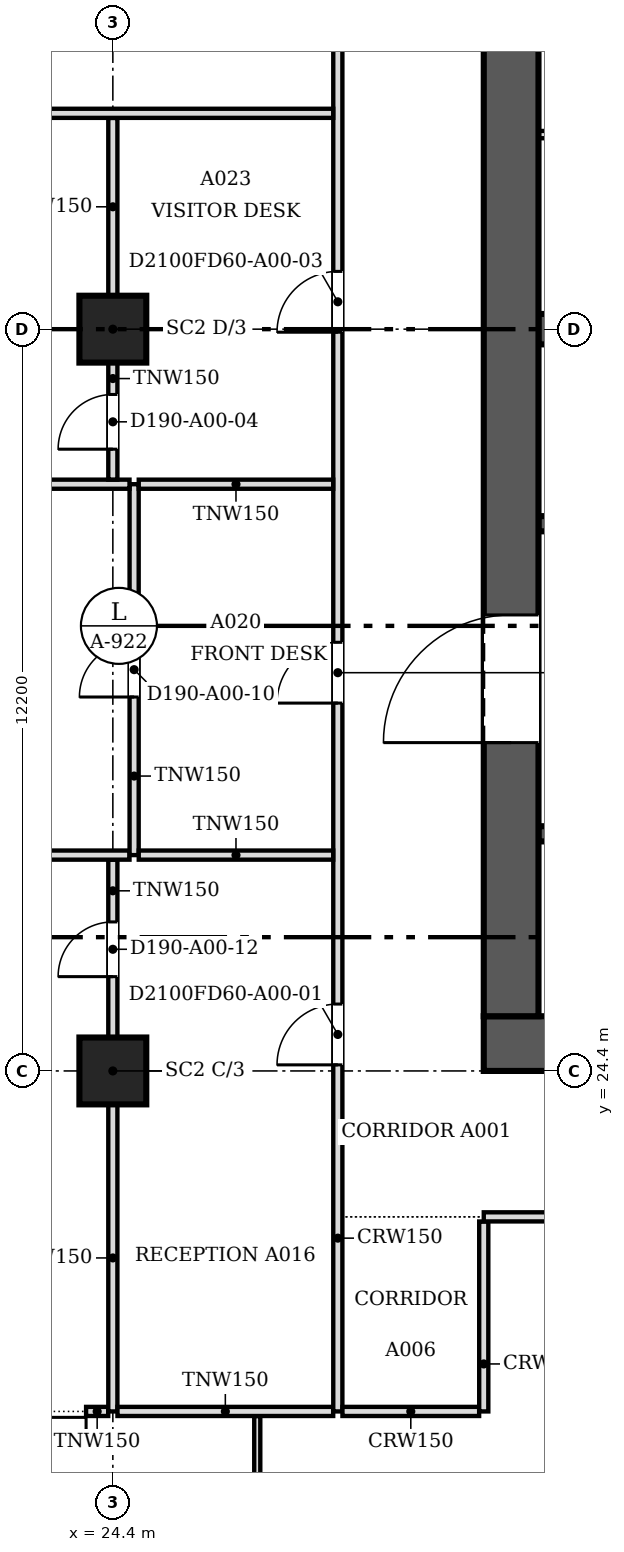
"""IFC4 building model, lengths in metres.
Left out: names, types, materials, properties, quantities, classifications, styles, units other than length and angle.
Written with IfcOpenShell. Run it as: python <this file> out.ifc"""

import sys

from ifc_helpers import new_model, si_unit, direction, frame, frame_2d, origin, origin_2d, place, context, subcontext, project, spatial, rectangle, extrude, source, transform, mapped, element, fill, save


model = new_model("IFC4")
c1 = context("Model", 3, precision=1e-05, world=origin(), true_north=direction((0.0, 1.0)))
c2 = subcontext(c1, "Body", "Model", "MODEL_VIEW")
j1 = project(units=[si_unit("LENGTHUNIT", "METRE"), si_unit("PLANEANGLEUNIT", "RADIAN")], contexts=[c1])
p1 = place(None, origin())
s1 = spatial("IfcSite", under=j1, at=p1, CompositionType="ELEMENT")
p2 = place(p1, origin())
s2 = spatial("IfcBuilding", under=s1, at=p2, CompositionType="ELEMENT")
p3 = place(p2, frame((0.0, 0.0, 16.8)))
s3 = spatial("IfcBuildingStorey", under=s2, at=p3, CompositionType="ELEMENT", Elevation=16.8)
for number, where, z_axis, x_axis in (
    (1, (24.4, 24.4, 0.0), (0.0, 0.0, 1.0), (1.0, 0.0, 0.0)),
    (2, (24.4, 36.6, 0.0), (0.0, 0.0, 1.0), (1.0, 0.0, 0.0)),
):
    element("IfcColumn", number, at=place(p3, frame(where, z_axis=z_axis, x_axis=x_axis)), inside=s3, PredefinedType="COLUMN", context=c2, shape_type="SweptSolid", body=[
        extrude(rectangle(XDim=1.1, YDim=1.1, at=origin_2d()), origin(), (0.0, 0.0, 1.0), 4.3),
    ])
p4 = place(p3, frame((54.9, 24.85, 0.0), z_axis=(0.0, 0.0, 1.0), x_axis=(-1.0, 0.0, 0.0)))
e3 = element("IfcWall", 3, at=p4, inside=s3, PredefinedType="SHEAR", context=c2, shape_type="SweptSolid", body=[
    extrude(rectangle(XDim=24.4, YDim=0.9, at=frame_2d((12.2, 0.0))), origin(), (0.0, 0.0, 1.0), 4.5),
])
m1 = source(origin(), c2, "Body", "SweptSolid", [
    extrude(rectangle(XDim=1.2, YDim=2.1, at=frame_2d((0.6, 1.05))), frame((0.0, 0.46, 0.0), z_axis=(0.0, -1.0, 0.0), x_axis=(1.0, 0.0, 0.0)), (0.0, 0.0, 1.0), 0.92),
])
p5 = place(p4, frame((1.5, 0.0, 0.0)))
e4 = element("IfcOpeningElement", 4, at=p5, cuts=e3, PredefinedType="OPENING", context=c2, shape_type="MappedRepresentation", body=[
    mapped(m1, transform((0.0, 0.0, 0.0), scale=1.0)),
])
p6 = place(p3, frame((30.95, 25.3, 0.0), z_axis=(0.0, 0.0, 1.0), x_axis=(0.0, 1.0, 0.0)))
e5 = element("IfcWall", 5, at=p6, inside=s3, PredefinedType="SHEAR", context=c2, shape_type="SweptSolid", body=[
    extrude(rectangle(XDim=22.6, YDim=0.9, at=frame_2d((11.3, 0.0))), origin(), (0.0, 0.0, 1.0), 4.5),
])
m2 = source(origin(), c2, "Body", "SweptSolid", [
    extrude(rectangle(XDim=2.1, YDim=2.4, at=frame_2d((1.05, 1.2))), frame((0.0, 0.46, 0.0), z_axis=(0.0, -1.0, 0.0), x_axis=(1.0, 0.0, 0.0)), (0.0, 0.0, 1.0), 0.92),
])
p7 = place(p6, frame((4.5, 0.0, 0.0)))
e6 = element("IfcOpeningElement", 6, at=p7, cuts=e5, PredefinedType="OPENING", context=c2, shape_type="MappedRepresentation", body=[
    mapped(m2, transform((0.0, 0.0, 0.0), scale=1.0)),
])
p8 = place(p6, frame((16.0, 0.0, 0.0)))
e7 = element("IfcOpeningElement", 7, at=p8, cuts=e5, PredefinedType="OPENING", context=c2, shape_type="MappedRepresentation", body=[
    mapped(m2, transform((0.0, 0.0, 0.0), scale=1.0)),
])
p9 = place(p3, frame((31.4, 36.6, 0.0), z_axis=(0.0, 0.0, 1.0), x_axis=(1.0, 0.0, 0.0)))
e8 = element("IfcWall", 8, at=p9, inside=s3, PredefinedType="SHEAR", context=c2, shape_type="SweptSolid", body=[
    extrude(rectangle(XDim=16.95, YDim=0.5, at=frame_2d((8.475, 0.0))), origin(), (0.0, 0.0, 1.0), 4.5),
])
p10 = place(p3, frame((42.45, 33.4, 0.0), z_axis=(0.0, 0.0, 1.0), x_axis=(-1.0, 0.0, 0.0)))
e9 = element("IfcWall", 9, at=p10, inside=s3, PredefinedType="SOLIDWALL", context=c2, shape_type="SweptSolid", body=[
    extrude(rectangle(XDim=11.05, YDim=0.25, at=frame_2d((5.525, 0.0))), origin(), (0.0, 0.0, 1.0), 4.5),
])
m3 = source(origin(), c2, "Body", "SweptSolid", [
    extrude(rectangle(XDim=1.1, YDim=2.1, at=frame_2d((0.55, 1.05))), frame((0.0, 0.135, 0.0), z_axis=(0.0, -1.0, 0.0), x_axis=(1.0, 0.0, 0.0)), (0.0, 0.0, 1.0), 0.27),
])
p11 = place(p10, frame((9.087, 0.0, 0.0)))
e10 = element("IfcOpeningElement", 10, at=p11, cuts=e9, PredefinedType="OPENING", context=c2, shape_type="MappedRepresentation", body=[
    mapped(m3, transform((0.0, 0.0, 0.0), scale=1.0)),
])
p12 = place(p10, frame((6.262, 0.0, 0.0)))
e11 = element("IfcOpeningElement", 11, at=p12, cuts=e9, PredefinedType="OPENING", context=c2, shape_type="MappedRepresentation", body=[
    mapped(m3, transform((0.0, 0.0, 0.0), scale=1.0)),
])
p13 = place(p10, frame((3.438, 0.0, 0.0)))
e12 = element("IfcOpeningElement", 12, at=p13, cuts=e9, PredefinedType="OPENING", context=c2, shape_type="MappedRepresentation", body=[
    mapped(m3, transform((0.0, 0.0, 0.0), scale=1.0)),
])
p14 = place(p10, frame((0.613, 0.0, 0.0)))
e13 = element("IfcOpeningElement", 13, at=p14, cuts=e9, PredefinedType="OPENING", context=c2, shape_type="MappedRepresentation", body=[
    mapped(m3, transform((0.0, 0.0, 0.0), scale=1.0)),
])
p15 = place(p3, frame((31.4, 28.3, 0.0), z_axis=(0.0, 0.0, 1.0), x_axis=(1.0, 0.0, 0.0)))
e14 = element("IfcWall", 14, at=p15, inside=s3, PredefinedType="SOLIDWALL", context=c2, shape_type="SweptSolid", body=[
    extrude(rectangle(XDim=11.05, YDim=0.25, at=frame_2d((5.525, 0.0))), origin(), (0.0, 0.0, 1.0), 4.5),
])
p16 = place(p15, frame((0.863, 0.0, 0.0)))
e15 = element("IfcOpeningElement", 15, at=p16, cuts=e14, PredefinedType="OPENING", context=c2, shape_type="MappedRepresentation", body=[
    mapped(m3, transform((0.0, 0.0, 0.0), scale=1.0)),
])
p17 = place(p15, frame((3.688, 0.0, 0.0)))
e16 = element("IfcOpeningElement", 16, at=p17, cuts=e14, PredefinedType="OPENING", context=c2, shape_type="MappedRepresentation", body=[
    mapped(m3, transform((0.0, 0.0, 0.0), scale=1.0)),
])
p18 = place(p15, frame((6.512, 0.0, 0.0)))
e17 = element("IfcOpeningElement", 17, at=p18, cuts=e14, PredefinedType="OPENING", context=c2, shape_type="MappedRepresentation", body=[
    mapped(m3, transform((0.0, 0.0, 0.0), scale=1.0)),
])
p19 = place(p15, frame((9.337, 0.0, 0.0)))
e18 = element("IfcOpeningElement", 18, at=p19, cuts=e14, PredefinedType="OPENING", context=c2, shape_type="MappedRepresentation", body=[
    mapped(m3, transform((0.0, 0.0, 0.0), scale=1.0)),
])
p20 = place(p3, frame((42.45, 39.8, 0.0), z_axis=(0.0, 0.0, 1.0), x_axis=(-1.0, 0.0, 0.0)))
e19 = element("IfcWall", 19, at=p20, inside=s3, PredefinedType="PARTITIONING", context=c2, shape_type="SweptSolid", body=[
    extrude(rectangle(XDim=11.05, YDim=0.12, at=frame_2d((5.525, 0.0))), origin(), (0.0, 0.0, 1.0), 4.3),
])
m4 = source(origin(), c2, "Body", "SweptSolid", [
    extrude(rectangle(XDim=0.9, YDim=2.1, at=frame_2d((0.45, 1.05))), frame((0.0, 0.07, 0.0), z_axis=(0.0, -1.0, 0.0), x_axis=(1.0, 0.0, 0.0)), (0.0, 0.0, 1.0), 0.14),
])
p21 = place(p20, frame((4.95, 0.0, 0.0)))
e20 = element("IfcOpeningElement", 20, at=p21, cuts=e19, PredefinedType="OPENING", context=c2, shape_type="MappedRepresentation", body=[
    mapped(m4, transform((0.0, 0.0, 0.0), scale=1.0)),
])
p22 = place(p3, frame((26.775, 13.276, 0.0), z_axis=(0.0, 0.0, 1.0), x_axis=(0.0, 1.0, 0.0)))
e21 = element("IfcWall", 21, at=p22, inside=s3, PredefinedType="PARTITIONING", context=c2, shape_type="SweptSolid", body=[
    extrude(rectangle(XDim=5.448, YDim=0.1, at=frame_2d((2.724, 0.0))), origin(), (0.0, 0.0, 1.0), 3.415),
])
m5 = source(origin(), c2, "Body", "SweptSolid", [
    extrude(rectangle(XDim=0.9, YDim=2.1, at=frame_2d((0.45, 1.05))), frame((0.0, 0.06, 0.0), z_axis=(0.0, -1.0, 0.0), x_axis=(1.0, 0.0, 0.0)), (0.0, 0.0, 1.0), 0.12),
])
p23 = place(p22, frame((2.3, 0.0, 0.0)))
e22 = element("IfcOpeningElement", 22, at=p23, cuts=e21, PredefinedType="OPENING", context=c2, shape_type="MappedRepresentation", body=[
    mapped(m5, transform((0.0, 0.0, 0.0), scale=1.0)),
])
p24 = place(p3, frame((23.96, 18.8, 0.0), z_axis=(0.0, 0.0, 1.0), x_axis=(1.0, 0.0, 0.0)))
e23 = element("IfcWall", 23, at=p24, inside=s3, PredefinedType="PARTITIONING", context=c2, shape_type="SweptSolid", body=[
    extrude(rectangle(XDim=0.364, YDim=0.15, at=frame_2d((0.182, 0.0))), origin(), (0.0, 0.0, 1.0), 3.415),
])
p25 = place(p3, frame((24.4, 18.8, 0.0), z_axis=(0.0, 0.0, 1.0), x_axis=(0.0, 1.0, 0.0)))
e24 = element("IfcWall", 24, at=p25, inside=s3, PredefinedType="PARTITIONING", context=c2, shape_type="SweptSolid", body=[
    extrude(rectangle(XDim=5.049, YDim=0.15, at=frame_2d((2.524, 0.0))), origin(), (0.0, 0.0, 1.0), 3.415),
])
p26 = place(p3, frame((24.476, 18.8, 0.0), z_axis=(0.0, 0.0, 1.0), x_axis=(1.0, 0.0, 0.0)))
e25 = element("IfcWall", 25, at=p26, inside=s3, PredefinedType="PARTITIONING", context=c2, shape_type="SweptSolid", body=[
    extrude(rectangle(XDim=3.548, YDim=0.15, at=frame_2d((1.774, 0.0))), origin(), (0.0, 0.0, 1.0), 3.415),
])
p27 = place(p3, frame((28.1, 18.8, 0.0), z_axis=(0.0, 0.0, 1.0), x_axis=(0.0, 1.0, 0.0)))
e26 = element("IfcWall", 26, at=p27, inside=s3, PredefinedType="PARTITIONING", context=c2, shape_type="SweptSolid", body=[
    extrude(rectangle(XDim=26.424, YDim=0.15, at=frame_2d((13.212, 0.0))), origin(), (0.0, 0.0, 1.0), 3.415),
])
m6 = source(origin(), c2, "Body", "SweptSolid", [
    extrude(rectangle(XDim=0.9, YDim=2.1, at=frame_2d((0.45, 1.05))), frame((0.0, 0.085, 0.0), z_axis=(0.0, -1.0, 0.0), x_axis=(1.0, 0.0, 0.0)), (0.0, 0.0, 1.0), 0.17),
])
p28 = place(p27, frame((23.451, 0.0, 0.0)))
e27 = element("IfcOpeningElement", 27, at=p28, cuts=e26, PredefinedType="OPENING", context=c2, shape_type="MappedRepresentation", body=[
    mapped(m6, transform((0.0, 0.0, 0.0), scale=1.0)),
])
m7 = source(origin(), c2, "Body", "SweptSolid", [
    extrude(rectangle(XDim=1.0, YDim=2.1, at=frame_2d((0.5, 1.05))), frame((0.0, 0.085, 0.0), z_axis=(0.0, -1.0, 0.0), x_axis=(1.0, 0.0, 0.0)), (0.0, 0.0, 1.0), 0.17),
])
p29 = place(p27, frame((5.7, 0.0, 0.0)))
e28 = element("IfcOpeningElement", 28, at=p29, cuts=e26, PredefinedType="OPENING", context=c2, shape_type="MappedRepresentation", body=[
    mapped(m7, transform((0.0, 0.0, 0.0), scale=1.0)),
])
p30 = place(p27, frame((11.65, 0.0, 0.0)))
e29 = element("IfcOpeningElement", 29, at=p30, cuts=e26, PredefinedType="OPENING", context=c2, shape_type="MappedRepresentation", body=[
    mapped(m7, transform((0.0, 0.0, 0.0), scale=1.0)),
])
p31 = place(p27, frame((17.75, 0.0, 0.0)))
e30 = element("IfcOpeningElement", 30, at=p31, cuts=e26, PredefinedType="OPENING", context=c2, shape_type="MappedRepresentation", body=[
    mapped(m7, transform((0.0, 0.0, 0.0), scale=1.0)),
])
p32 = place(p3, frame((28.176, 18.8, 0.0), z_axis=(0.0, 0.0, 1.0), x_axis=(1.0, 0.0, 0.0)))
e31 = element("IfcWall", 31, at=p32, inside=s3, PredefinedType="PARTITIONING", context=c2, shape_type="SweptSolid", body=[
    extrude(rectangle(XDim=2.248, YDim=0.15, at=frame_2d((1.124, 0.0))), origin(), (0.0, 0.0, 1.0), 3.415),
])
p33 = place(p3, frame((30.5, 18.8, 0.0), z_axis=(0.0, 0.0, 1.0), x_axis=(0.0, 1.0, 0.0)))
e32 = element("IfcWall", 32, at=p33, inside=s3, PredefinedType="PARTITIONING", context=c2, shape_type="SweptSolid", body=[
    extrude(rectangle(XDim=3.124, YDim=0.15, at=frame_2d((1.562, 0.0))), origin(), (0.0, 0.0, 1.0), 3.415),
])
p34 = place(p3, frame((30.5, 22.0, 0.0), z_axis=(0.0, 0.0, 1.0), x_axis=(1.0, 0.0, 0.0)))
e33 = element("IfcWall", 33, at=p34, inside=s3, PredefinedType="PARTITIONING", context=c2, shape_type="SweptSolid", body=[
    extrude(rectangle(XDim=13.5, YDim=0.15, at=frame_2d((6.75, 0.0))), origin(), (0.0, 0.0, 1.0), 3.415),
])
p35 = place(p3, frame((24.4, 24.951, 0.0), z_axis=(0.0, 0.0, 1.0), x_axis=(0.0, 1.0, 0.0)))
e34 = element("IfcWall", 34, at=p35, inside=s3, PredefinedType="PARTITIONING", context=c2, shape_type="SweptSolid", body=[
    extrude(rectangle(XDim=2.923, YDim=0.15, at=frame_2d((1.461, 0.0))), origin(), (0.0, 0.0, 1.0), 3.415),
])
p36 = place(p35, frame((1.0, 0.0, 0.0)))
e35 = element("IfcOpeningElement", 35, at=p36, cuts=e34, PredefinedType="OPENING", context=c2, shape_type="MappedRepresentation", body=[
    mapped(m6, transform((0.0, 0.0, 0.0), scale=1.0)),
])
p37 = place(p3, frame((0.5, 27.95, 0.0), z_axis=(0.0, 0.0, 1.0), x_axis=(1.0, 0.0, 0.0)))
e36 = element("IfcWall", 36, at=p37, inside=s3, PredefinedType="PARTITIONING", context=c2, shape_type="SweptSolid", body=[
    extrude(rectangle(XDim=24.174, YDim=0.15, at=frame_2d((12.087, 0.0))), origin(), (0.0, 0.0, 1.0), 3.415),
])
p38 = place(p3, frame((24.75, 27.95, 0.0), z_axis=(0.0, 0.0, 1.0), x_axis=(0.0, 1.0, 0.0)))
e37 = element("IfcWall", 37, at=p38, inside=s3, PredefinedType="PARTITIONING", context=c2, shape_type="SweptSolid", body=[
    extrude(rectangle(XDim=6.1, YDim=0.15, at=frame_2d((3.05, 0.0))), origin(), (0.0, 0.0, 1.0), 3.415),
])
p39 = place(p38, frame((2.6, 0.0, 0.0)))
e38 = element("IfcOpeningElement", 38, at=p39, cuts=e37, PredefinedType="OPENING", context=c2, shape_type="MappedRepresentation", body=[
    mapped(m6, transform((0.0, 0.0, 0.0), scale=1.0)),
])
p40 = place(p3, frame((24.826, 27.95, 0.0), z_axis=(0.0, 0.0, 1.0), x_axis=(1.0, 0.0, 0.0)))
e39 = element("IfcWall", 39, at=p40, inside=s3, PredefinedType="PARTITIONING", context=c2, shape_type="SweptSolid", body=[
    extrude(rectangle(XDim=3.198, YDim=0.15, at=frame_2d((1.599, 0.0))), origin(), (0.0, 0.0, 1.0), 3.415),
])
p41 = place(p3, frame((0.5, 34.05, 0.0), z_axis=(0.0, 0.0, 1.0), x_axis=(1.0, 0.0, 0.0)))
e40 = element("IfcWall", 40, at=p41, inside=s3, PredefinedType="PARTITIONING", context=c2, shape_type="SweptSolid", body=[
    extrude(rectangle(XDim=24.174, YDim=0.15, at=frame_2d((12.087, 0.0))), origin(), (0.0, 0.0, 1.0), 3.415),
])
p42 = place(p3, frame((24.826, 34.05, 0.0), z_axis=(0.0, 0.0, 1.0), x_axis=(1.0, 0.0, 0.0)))
e41 = element("IfcWall", 41, at=p42, inside=s3, PredefinedType="PARTITIONING", context=c2, shape_type="SweptSolid", body=[
    extrude(rectangle(XDim=3.198, YDim=0.15, at=frame_2d((1.599, 0.0))), origin(), (0.0, 0.0, 1.0), 3.415),
])
p43 = place(p3, frame((24.4, 34.126, 0.0), z_axis=(0.0, 0.0, 1.0), x_axis=(0.0, 1.0, 0.0)))
e42 = element("IfcWall", 42, at=p43, inside=s3, PredefinedType="PARTITIONING", context=c2, shape_type="SweptSolid", body=[
    extrude(rectangle(XDim=1.923, YDim=0.15, at=frame_2d((0.961, 0.0))), origin(), (0.0, 0.0, 1.0), 3.415),
])
p44 = place(p43, frame((0.5, 0.0, 0.0)))
e43 = element("IfcOpeningElement", 43, at=p44, cuts=e42, PredefinedType="OPENING", context=c2, shape_type="MappedRepresentation", body=[
    mapped(m6, transform((0.0, 0.0, 0.0), scale=1.0)),
])
p45 = place(p3, frame((24.4, 37.151, 0.0), z_axis=(0.0, 0.0, 1.0), x_axis=(0.0, 1.0, 0.0)))
e44 = element("IfcWall", 44, at=p45, inside=s3, PredefinedType="PARTITIONING", context=c2, shape_type="SweptSolid", body=[
    extrude(rectangle(XDim=2.923, YDim=0.15, at=frame_2d((1.461, 0.0))), origin(), (0.0, 0.0, 1.0), 3.415),
])
p46 = place(p3, frame((7.5, 40.15, 0.0), z_axis=(0.0, 0.0, 1.0), x_axis=(1.0, 0.0, 0.0)))
e45 = element("IfcWall", 45, at=p46, inside=s3, PredefinedType="PARTITIONING", context=c2, shape_type="SweptSolid", body=[
    extrude(rectangle(XDim=20.524, YDim=0.15, at=frame_2d((10.262, 0.0))), origin(), (0.0, 0.0, 1.0), 3.415),
])
m8 = source(origin(), c2, "Body", "SweptSolid", [
    extrude(rectangle(XDim=2.1, YDim=2.4, at=frame_2d((1.05, 1.2))), frame((0.0, 0.025, 0.0), z_axis=(0.0, -1.0, 0.0), x_axis=(1.0, 0.0, 0.0)), (0.0, 0.0, 1.0), 0.05),
])
p47 = place(p7, origin())
e46 = element("IfcDoor", 46, at=p47, inside=s3, OperationType="DOUBLE_DOOR_SINGLE_SWING", PredefinedType="DOOR", context=c2, shape_type="MappedRepresentation", body=[
    mapped(m8, transform((0.0, 0.0, 0.0), scale=1.0)),
])
fill(e6, e46)
m9 = source(origin(), c2, "Body", "SweptSolid", [
    extrude(rectangle(XDim=0.9, YDim=2.1, at=frame_2d((0.45, 1.05))), frame((0.0, 0.025, 0.0), z_axis=(0.0, -1.0, 0.0), x_axis=(1.0, 0.0, 0.0)), (0.0, 0.0, 1.0), 0.05),
])
p48 = place(p44, origin())
e47 = element("IfcDoor", 47, at=p48, inside=s3, OperationType="SINGLE_SWING_LEFT", PredefinedType="DOOR", context=c2, shape_type="MappedRepresentation", body=[
    mapped(m9, transform((0.0, 0.0, 0.0), scale=1.0)),
])
fill(e43, e47)
m10 = source(origin(), c2, "Body", "SweptSolid", [
    extrude(rectangle(XDim=1.0, YDim=2.1, at=frame_2d((0.5, 1.05))), frame((0.0, 0.025, 0.0), z_axis=(0.0, -1.0, 0.0), x_axis=(1.0, 0.0, 0.0)), (0.0, 0.0, 1.0), 0.05),
])
p49 = place(p29, origin())
e48 = element("IfcDoor", 48, at=p49, inside=s3, OperationType="SINGLE_SWING_LEFT", PredefinedType="DOOR", context=c2, shape_type="MappedRepresentation", body=[
    mapped(m10, transform((0.0, 0.0, 0.0), scale=1.0)),
])
fill(e28, e48)
p50 = place(p30, origin())
e49 = element("IfcDoor", 49, at=p50, inside=s3, OperationType="SINGLE_SWING_LEFT", PredefinedType="DOOR", context=c2, shape_type="MappedRepresentation", body=[
    mapped(m10, transform((0.0, 0.0, 0.0), scale=1.0)),
])
fill(e29, e49)
p51 = place(p39, origin())
e50 = element("IfcDoor", 50, at=p51, inside=s3, OperationType="SINGLE_SWING_LEFT", PredefinedType="DOOR", context=c2, shape_type="MappedRepresentation", body=[
    mapped(m9, transform((0.0, 0.0, 0.0), scale=1.0)),
])
fill(e38, e50)
p52 = place(p31, origin())
e51 = element("IfcDoor", 51, at=p52, inside=s3, OperationType="SINGLE_SWING_LEFT", PredefinedType="DOOR", context=c2, shape_type="MappedRepresentation", body=[
    mapped(m10, transform((0.0, 0.0, 0.0), scale=1.0)),
])
fill(e30, e51)
p53 = place(p36, origin())
e52 = element("IfcDoor", 52, at=p53, inside=s3, OperationType="SINGLE_SWING_LEFT", PredefinedType="DOOR", context=c2, shape_type="MappedRepresentation", body=[
    mapped(m9, transform((0.0, 0.0, 0.0), scale=1.0)),
])
fill(e35, e52)
save(model, sys.argv[1])
